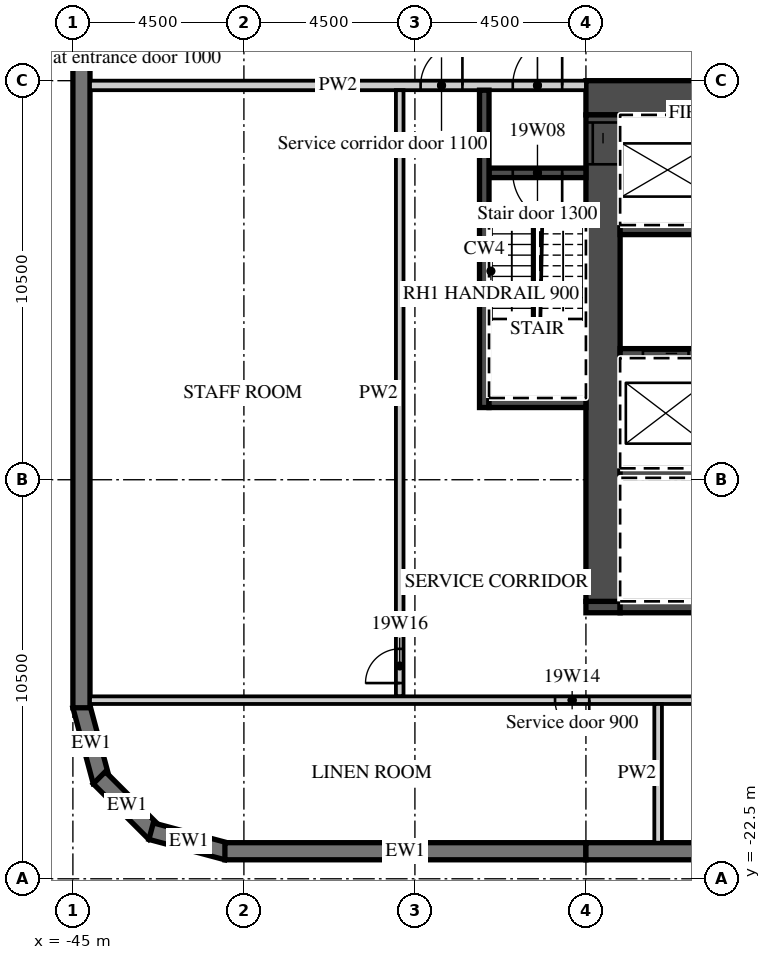
"""IFC4 building model, lengths in metres.
Left out: names, types, materials, properties, quantities, classifications, styles, units other than length and angle.
Written with IfcOpenShell. Run it as: python <this file> out.ifc"""

import sys

from ifc_helpers import new_model, si_unit, direction, frame, frame_2d, origin, place, context, subcontext, project, spatial, polyline, rectangle, outline, extrude, element, fill, save


model = new_model("IFC4")
c1 = context("Model", 3, precision=1e-05, world=origin(), true_north=direction((0.0, 1.0)))
c2 = subcontext(c1, "Body", "Model", "MODEL_VIEW")
j1 = project(units=[si_unit("LENGTHUNIT", "METRE"), si_unit("PLANEANGLEUNIT", "RADIAN")], contexts=[c1])
p1 = place(None, origin())
s1 = spatial("IfcSite", under=j1, at=p1, CompositionType="ELEMENT")
p2 = place(p1, origin())
s2 = spatial("IfcBuilding", under=s1, at=p2, CompositionType="ELEMENT")
p3 = place(p2, frame((0.0, 0.0, 93.0)))
s3 = spatial("IfcBuildingStorey", under=s2, at=p3, CompositionType="ELEMENT", Elevation=93.0)
p4 = place(p3, frame((-44.783, -17.942, 0.0), z_axis=(0.0, 0.0, 1.0), x_axis=(0.25881466832, -0.965926999034, 0.0)))
e1 = element("IfcWall", 1, at=p4, inside=s3, PredefinedType="SOLIDWALL", context=c2, shape_type="SweptSolid", body=[
    extrude(outline(polyline([(0.0, -0.225), (2.071, -0.225), (1.95, 0.225), (0.121, 0.225), (0.0, -0.225)])), origin(), (0.0, 0.0, 1.0), 3.02),
])
p5 = place(p3, frame((-44.305, -19.841, 0.0), z_axis=(0.0, 0.0, 1.0), x_axis=(0.707106781187, -0.707106781187, 0.0)))
e2 = element("IfcWall", 2, at=p5, inside=s3, PredefinedType="SOLIDWALL", context=c2, shape_type="SweptSolid", body=[
    extrude(outline(polyline([(0.0, -0.225), (2.071, -0.225), (1.95, 0.225), (0.121, 0.225), (0.0, -0.225)])), origin(), (0.0, 0.0, 1.0), 3.02),
])
p6 = place(p3, frame((-42.942, -21.247, 0.0), z_axis=(0.0, 0.0, 1.0), x_axis=(0.965926999034, -0.25881466832, 0.0)))
e3 = element("IfcWall", 3, at=p6, inside=s3, PredefinedType="SOLIDWALL", context=c2, shape_type="SweptSolid", body=[
    extrude(outline(polyline([(-0.0, -0.225), (2.07, -0.225), (1.95, 0.225), (0.12, 0.225), (-0.0, -0.225)])), origin(), (0.0, 0.0, 1.0), 3.02),
])
p7 = place(p3, frame((-41.0, -21.775, 0.0), z_axis=(0.0, 0.0, 1.0), x_axis=(1.0, 0.0, 0.0)))
e4 = element("IfcWall", 4, at=p7, inside=s3, PredefinedType="SOLIDWALL", context=c2, shape_type="SweptSolid", body=[
    extrude(rectangle(XDim=9.5, YDim=0.45, at=frame_2d((4.75, 0.0))), origin(), (0.0, 0.0, 1.0), 3.02),
])
p8 = place(p3, frame((-31.5, -21.775, 0.0), z_axis=(0.0, 0.0, 1.0), x_axis=(1.0, 0.0, 0.0)))
e5 = element("IfcWall", 5, at=p8, inside=s3, PredefinedType="SOLIDWALL", context=c2, shape_type="SweptSolid", body=[
    extrude(rectangle(XDim=18.0, YDim=0.45, at=frame_2d((9.0, 0.0))), origin(), (0.0, 0.0, 1.0), 3.02),
])
p9 = place(p3, frame((-44.775, 18.0, 0.0), z_axis=(0.0, 0.0, 1.0), x_axis=(0.0, -1.0, 0.0)))
e6 = element("IfcWall", 6, at=p9, inside=s3, PredefinedType="SOLIDWALL", context=c2, shape_type="SweptSolid", body=[
    extrude(rectangle(XDim=36.0, YDim=0.45, at=frame_2d((18.0, 0.0))), origin(), (0.0, 0.0, 1.0), 3.02),
])
p10 = place(p9, frame((3.9, 0.0, 0.45)))
e7 = element("IfcOpeningElement", 7, at=p10, cuts=e6, PredefinedType="OPENING", context=c2, shape_type="SweptSolid", body=[
    extrude(rectangle(XDim=3.3, YDim=2.25, at=frame_2d((1.65, 1.125))), frame((0.0, 0.235, 0.0), z_axis=(0.0, -1.0, 0.0), x_axis=(1.0, 0.0, 0.0)), (0.0, 0.0, 1.0), 0.47),
])
p11 = place(p9, frame((8.4, 0.0, 0.45)))
e8 = element("IfcOpeningElement", 8, at=p11, cuts=e6, PredefinedType="OPENING", context=c2, shape_type="SweptSolid", body=[
    extrude(rectangle(XDim=3.3, YDim=2.25, at=frame_2d((1.65, 1.125))), frame((0.0, 0.235, 0.0), z_axis=(0.0, -1.0, 0.0), x_axis=(1.0, 0.0, 0.0)), (0.0, 0.0, 1.0), 0.47),
])
p12 = place(p9, frame((12.9, 0.0, 0.45)))
e9 = element("IfcOpeningElement", 9, at=p12, cuts=e6, PredefinedType="OPENING", context=c2, shape_type="SweptSolid", body=[
    extrude(rectangle(XDim=3.3, YDim=2.25, at=frame_2d((1.65, 1.125))), frame((0.0, 0.235, 0.0), z_axis=(0.0, -1.0, 0.0), x_axis=(1.0, 0.0, 0.0)), (0.0, 0.0, 1.0), 0.47),
])
p13 = place(p3, frame((-31.5, -1.95, 0.0), z_axis=(0.0, 0.0, 1.0), x_axis=(1.0, 0.0, 0.0)))
e10 = element("IfcWall", 10, at=p13, inside=s3, PredefinedType="SHEAR", context=c2, shape_type="SweptSolid", body=[
    extrude(rectangle(XDim=18.0, YDim=0.9, at=frame_2d((9.0, 0.0))), origin(), (0.0, 0.0, 1.0), 3.02),
])
p14 = place(p13, frame((14.725, 0.0, 0.0)))
e11 = element("IfcOpeningElement", 11, at=p14, cuts=e10, PredefinedType="OPENING", context=c2, shape_type="SweptSolid", body=[
    extrude(rectangle(XDim=1.8, YDim=2.1, at=frame_2d((0.9, 1.05))), frame((0.0, 0.46, 0.0), z_axis=(0.0, -1.0, 0.0), x_axis=(1.0, 0.0, 0.0)), (0.0, 0.0, 1.0), 0.92),
])
p15 = place(p3, frame((-31.5, -15.35, 0.0), z_axis=(0.0, 0.0, 1.0), x_axis=(1.0, 0.0, 0.0)))
e12 = element("IfcWall", 12, at=p15, inside=s3, PredefinedType="SHEAR", context=c2, shape_type="SweptSolid", body=[
    extrude(rectangle(XDim=0.9, YDim=0.3, at=frame_2d((0.45, 0.0))), origin(), (0.0, 0.0, 1.0), 3.02),
])
p16 = place(p3, frame((-30.6, -15.35, 0.0), z_axis=(0.0, 0.0, 1.0), x_axis=(1.0, 0.0, 0.0)))
e13 = element("IfcWall", 13, at=p16, inside=s3, PredefinedType="SHEAR", context=c2, shape_type="SweptSolid", body=[
    extrude(rectangle(XDim=10.3, YDim=0.3, at=frame_2d((5.15, 0.0))), origin(), (0.0, 0.0, 1.0), 3.02),
])
p17 = place(p16, frame((5.0, 0.0, 0.0)))
e14 = element("IfcOpeningElement", 14, at=p17, cuts=e13, PredefinedType="OPENING", context=c2, shape_type="SweptSolid", body=[
    extrude(rectangle(XDim=1.3, YDim=2.1, at=frame_2d((0.65, 1.05))), frame((0.0, 0.16, 0.0), z_axis=(0.0, -1.0, 0.0), x_axis=(1.0, 0.0, 0.0)), (0.0, 0.0, 1.0), 0.32),
])
p18 = place(p16, frame((6.837, 0.0, 0.0)))
e15 = element("IfcOpeningElement", 15, at=p18, cuts=e13, PredefinedType="OPENING", context=c2, shape_type="SweptSolid", body=[
    extrude(rectangle(XDim=0.9, YDim=2.1, at=frame_2d((0.45, 1.05))), frame((0.0, 0.16, 0.0), z_axis=(0.0, -1.0, 0.0), x_axis=(1.0, 0.0, 0.0)), (0.0, 0.0, 1.0), 0.32),
])
p19 = place(p16, frame((8.663, 0.0, 0.0)))
e16 = element("IfcOpeningElement", 16, at=p19, cuts=e13, PredefinedType="OPENING", context=c2, shape_type="SweptSolid", body=[
    extrude(rectangle(XDim=0.9, YDim=2.1, at=frame_2d((0.45, 1.05))), frame((0.0, 0.16, 0.0), z_axis=(0.0, -1.0, 0.0), x_axis=(1.0, 0.0, 0.0)), (0.0, 0.0, 1.0), 0.32),
])
p20 = place(p3, frame((-31.05, -15.2, 0.0), z_axis=(0.0, 0.0, 1.0), x_axis=(0.0, 1.0, 0.0)))
e17 = element("IfcWall", 17, at=p20, inside=s3, PredefinedType="SHEAR", context=c2, shape_type="SweptSolid", body=[
    extrude(rectangle(XDim=12.8, YDim=0.9, at=frame_2d((6.4, 0.0))), origin(), (0.0, 0.0, 1.0), 3.02),
])
p21 = place(p20, frame((11.5, 0.0, 0.0)))
e18 = element("IfcOpeningElement", 18, at=p21, cuts=e17, PredefinedType="OPENING", context=c2, shape_type="SweptSolid", body=[
    extrude(rectangle(XDim=1.1, YDim=2.1, at=frame_2d((0.55, 1.05))), frame((0.0, 0.46, 0.0), z_axis=(0.0, -1.0, 0.0), x_axis=(1.0, 0.0, 0.0)), (0.0, 0.0, 1.0), 0.92),
])
p22 = place(p3, frame((-30.6, -5.425, 0.0), z_axis=(0.0, 0.0, 1.0), x_axis=(1.0, 0.0, 0.0)))
e19 = element("IfcWall", 19, at=p22, inside=s3, PredefinedType="SHEAR", context=c2, shape_type="SweptSolid", body=[
    extrude(rectangle(XDim=13.0, YDim=0.25, at=frame_2d((6.5, 0.0))), origin(), (0.0, 0.0, 1.0), 3.02),
])
p23 = place(p3, frame((-30.6, -8.675, 0.0), z_axis=(0.0, 0.0, 1.0), x_axis=(1.0, 0.0, 0.0)))
e20 = element("IfcWall", 20, at=p23, inside=s3, PredefinedType="SHEAR", context=c2, shape_type="SweptSolid", body=[
    extrude(rectangle(XDim=16.2, YDim=0.25, at=frame_2d((8.1, 0.0))), origin(), (0.0, 0.0, 1.0), 3.02),
])
p24 = place(p23, frame((0.6, 0.0, 0.0)))
e21 = element("IfcOpeningElement", 21, at=p24, cuts=e20, PredefinedType="OPENING", context=c2, shape_type="SweptSolid", body=[
    extrude(rectangle(XDim=1.2, YDim=2.1, at=frame_2d((0.6, 1.05))), frame((0.0, 0.135, 0.0), z_axis=(0.0, -1.0, 0.0), x_axis=(1.0, 0.0, 0.0)), (0.0, 0.0, 1.0), 0.27),
])
p25 = place(p23, frame((3.25, 0.0, 0.0)))
e22 = element("IfcOpeningElement", 22, at=p25, cuts=e20, PredefinedType="OPENING", context=c2, shape_type="SweptSolid", body=[
    extrude(rectangle(XDim=1.2, YDim=2.1, at=frame_2d((0.6, 1.05))), frame((0.0, 0.135, 0.0), z_axis=(0.0, -1.0, 0.0), x_axis=(1.0, 0.0, 0.0)), (0.0, 0.0, 1.0), 0.27),
])
p26 = place(p23, frame((5.9, 0.0, 0.0)))
e23 = element("IfcOpeningElement", 23, at=p26, cuts=e20, PredefinedType="OPENING", context=c2, shape_type="SweptSolid", body=[
    extrude(rectangle(XDim=1.2, YDim=2.1, at=frame_2d((0.6, 1.05))), frame((0.0, 0.135, 0.0), z_axis=(0.0, -1.0, 0.0), x_axis=(1.0, 0.0, 0.0)), (0.0, 0.0, 1.0), 0.27),
])
p27 = place(p23, frame((14.25, 0.0, 0.0)))
e24 = element("IfcOpeningElement", 24, at=p27, cuts=e20, PredefinedType="OPENING", context=c2, shape_type="SweptSolid", body=[
    extrude(rectangle(XDim=1.3, YDim=2.1, at=frame_2d((0.65, 1.05))), frame((0.0, 0.135, 0.0), z_axis=(0.0, -1.0, 0.0), x_axis=(1.0, 0.0, 0.0)), (0.0, 0.0, 1.0), 0.27),
])
p28 = place(p3, frame((-30.6, -11.825, 0.0), z_axis=(0.0, 0.0, 1.0), x_axis=(1.0, 0.0, 0.0)))
e25 = element("IfcWall", 25, at=p28, inside=s3, PredefinedType="SHEAR", context=c2, shape_type="SweptSolid", body=[
    extrude(rectangle(XDim=13.25, YDim=0.25, at=frame_2d((6.625, 0.0))), origin(), (0.0, 0.0, 1.0), 3.02),
])
p29 = place(p3, frame((-44.55, -1.625, 0.0), z_axis=(0.0, 0.0, 1.0), x_axis=(1.0, 0.0, 0.0)))
e26 = element("IfcWall", 26, at=p29, inside=s3, PredefinedType="PARTITIONING", context=c2, shape_type="SweptSolid", body=[
    extrude(rectangle(XDim=13.05, YDim=0.25, at=frame_2d((6.525, 0.0))), origin(), (0.0, 0.0, 1.0), 3.02),
])
p30 = place(p29, frame((11.125, 0.0, 0.0)))
e27 = element("IfcOpeningElement", 27, at=p30, cuts=e26, PredefinedType="OPENING", context=c2, shape_type="SweptSolid", body=[
    extrude(rectangle(XDim=1.3, YDim=2.1, at=frame_2d((0.65, 1.05))), frame((0.0, 0.135, 0.0), z_axis=(0.0, -1.0, 0.0), x_axis=(1.0, 0.0, 0.0)), (0.0, 0.0, 1.0), 0.27),
])
p31 = place(p29, frame((8.7, 0.0, 0.0)))
e28 = element("IfcOpeningElement", 28, at=p31, cuts=e26, PredefinedType="OPENING", context=c2, shape_type="SweptSolid", body=[
    extrude(rectangle(XDim=1.1, YDim=2.1, at=frame_2d((0.55, 1.05))), frame((0.0, 0.135, 0.0), z_axis=(0.0, -1.0, 0.0), x_axis=(1.0, 0.0, 0.0)), (0.0, 0.0, 1.0), 0.27),
])
p32 = place(p3, frame((-34.05, -3.925, 0.0), z_axis=(0.0, 0.0, 1.0), x_axis=(1.0, 0.0, 0.0)))
e29 = element("IfcWall", 29, at=p32, inside=s3, PredefinedType="SHEAR", context=c2, shape_type="SweptSolid", body=[
    extrude(rectangle(XDim=2.55, YDim=0.25, at=frame_2d((1.275, 0.0))), origin(), (0.0, 0.0, 1.0), 3.02),
])
p33 = place(p32, frame((0.625, 0.0, 0.0)))
e30 = element("IfcOpeningElement", 30, at=p33, cuts=e29, PredefinedType="OPENING", context=c2, shape_type="SweptSolid", body=[
    extrude(rectangle(XDim=1.3, YDim=2.1, at=frame_2d((0.65, 1.05))), frame((0.0, 0.135, 0.0), z_axis=(0.0, -1.0, 0.0), x_axis=(1.0, 0.0, 0.0)), (0.0, 0.0, 1.0), 0.27),
])
p34 = place(p3, frame((-34.175, -10.1, 0.0), z_axis=(0.0, 0.0, 1.0), x_axis=(0.0, 1.0, 0.0)))
e31 = element("IfcWall", 31, at=p34, inside=s3, PredefinedType="SHEAR", context=c2, shape_type="SweptSolid", body=[
    extrude(rectangle(XDim=8.35, YDim=0.25, at=frame_2d((4.175, 0.0))), origin(), (0.0, 0.0, 1.0), 3.02),
])
p35 = place(p3, frame((-34.05, -9.975, 0.0), z_axis=(0.0, 0.0, 1.0), x_axis=(1.0, 0.0, 0.0)))
e32 = element("IfcWall", 32, at=p35, inside=s3, PredefinedType="SHEAR", context=c2, shape_type="SweptSolid", body=[
    extrude(rectangle(XDim=2.55, YDim=0.25, at=frame_2d((1.275, 0.0))), origin(), (0.0, 0.0, 1.0), 3.02),
])
p36 = place(p3, frame((-36.4, -17.7, 0.0), z_axis=(0.0, 0.0, 1.0), x_axis=(0.0, 1.0, 0.0)))
e33 = element("IfcWall", 33, at=p36, inside=s3, PredefinedType="PARTITIONING", context=c2, shape_type="SweptSolid", body=[
    extrude(rectangle(XDim=15.95, YDim=0.2, at=frame_2d((7.975, 0.0))), origin(), (0.0, 0.0, 1.0), 3.02),
])
p37 = place(p36, frame((0.35, 0.0, 0.0)))
e34 = element("IfcOpeningElement", 34, at=p37, cuts=e33, PredefinedType="OPENING", context=c2, shape_type="SweptSolid", body=[
    extrude(rectangle(XDim=0.9, YDim=2.1, at=frame_2d((0.45, 1.05))), frame((0.0, 0.11, 0.0), z_axis=(0.0, -1.0, 0.0), x_axis=(1.0, 0.0, 0.0)), (0.0, 0.0, 1.0), 0.22),
])
p38 = place(p3, frame((-44.55, -17.8, 0.0), z_axis=(0.0, 0.0, 1.0), x_axis=(1.0, 0.0, 0.0)))
e35 = element("IfcWall", 35, at=p38, inside=s3, PredefinedType="PARTITIONING", context=c2, shape_type="SweptSolid", body=[
    extrude(rectangle(XDim=30.95, YDim=0.2, at=frame_2d((15.475, 0.0))), origin(), (0.0, 0.0, 1.0), 3.02),
])
p39 = place(p38, frame((12.238, 0.0, 0.0)))
e36 = element("IfcOpeningElement", 36, at=p39, cuts=e35, PredefinedType="OPENING", context=c2, shape_type="SweptSolid", body=[
    extrude(rectangle(XDim=0.9, YDim=2.1, at=frame_2d((0.45, 1.05))), frame((0.0, 0.11, 0.0), z_axis=(0.0, -1.0, 0.0), x_axis=(1.0, 0.0, 0.0)), (0.0, 0.0, 1.0), 0.22),
])
p40 = place(p38, frame((20.538, 0.0, 0.0)))
e37 = element("IfcOpeningElement", 37, at=p40, cuts=e35, PredefinedType="OPENING", context=c2, shape_type="SweptSolid", body=[
    extrude(rectangle(XDim=0.9, YDim=2.1, at=frame_2d((0.45, 1.05))), frame((0.0, 0.11, 0.0), z_axis=(0.0, -1.0, 0.0), x_axis=(1.0, 0.0, 0.0)), (0.0, 0.0, 1.0), 0.22),
])
p41 = place(p3, frame((-29.6, -21.55, 0.0), z_axis=(0.0, 0.0, 1.0), x_axis=(0.0, 1.0, 0.0)))
e38 = element("IfcWall", 38, at=p41, inside=s3, PredefinedType="PARTITIONING", context=c2, shape_type="SweptSolid", body=[
    extrude(rectangle(XDim=3.65, YDim=0.2, at=frame_2d((1.825, 0.0))), origin(), (0.0, 0.0, 1.0), 3.02),
])
p42 = place(p24, origin())
e39 = element("IfcDoor", 39, at=p42, inside=s3, OperationType="SLIDING_TO_LEFT", PredefinedType="DOOR", context=c2, shape_type="SweptSolid", body=[
    extrude(rectangle(XDim=1.2, YDim=2.1, at=frame_2d((0.6, 1.05))), frame((0.0, 0.025, 0.0), z_axis=(0.0, -1.0, 0.0), x_axis=(1.0, 0.0, 0.0)), (0.0, 0.0, 1.0), 0.05),
])
fill(e21, e39)
p43 = place(p21, origin())
e40 = element("IfcDoor", 40, at=p43, inside=s3, OperationType="SLIDING_TO_RIGHT", PredefinedType="DOOR", context=c2, shape_type="SweptSolid", body=[
    extrude(rectangle(XDim=1.1, YDim=2.1, at=frame_2d((0.55, 1.05))), frame((0.0, 0.025, 0.0), z_axis=(0.0, -1.0, 0.0), x_axis=(1.0, 0.0, 0.0)), (0.0, 0.0, 1.0), 0.05),
])
fill(e18, e40)
p44 = place(p30, origin())
e41 = element("IfcDoor", 41, at=p44, inside=s3, OperationType="SINGLE_SWING_RIGHT", PredefinedType="DOOR", context=c2, shape_type="SweptSolid", body=[
    extrude(rectangle(XDim=1.3, YDim=2.1, at=frame_2d((0.65, 1.05))), frame((0.0, 0.025, 0.0), z_axis=(0.0, -1.0, 0.0), x_axis=(1.0, 0.0, 0.0)), (0.0, 0.0, 1.0), 0.05),
])
fill(e27, e41)
p45 = place(p33, origin())
e42 = element("IfcDoor", 42, at=p45, inside=s3, OperationType="SINGLE_SWING_RIGHT", PredefinedType="DOOR", context=c2, shape_type="SweptSolid", body=[
    extrude(rectangle(XDim=1.3, YDim=2.1, at=frame_2d((0.65, 1.05))), frame((0.0, 0.025, 0.0), z_axis=(0.0, -1.0, 0.0), x_axis=(1.0, 0.0, 0.0)), (0.0, 0.0, 1.0), 0.05),
])
fill(e30, e42)
p46 = place(p31, origin())
e43 = element("IfcDoor", 43, at=p46, inside=s3, OperationType="SINGLE_SWING_RIGHT", PredefinedType="DOOR", context=c2, shape_type="SweptSolid", body=[
    extrude(rectangle(XDim=1.1, YDim=2.1, at=frame_2d((0.55, 1.05))), frame((0.0, 0.025, 0.0), z_axis=(0.0, -1.0, 0.0), x_axis=(1.0, 0.0, 0.0)), (0.0, 0.0, 1.0), 0.05),
])
fill(e28, e43)
p47 = place(p39, origin())
e44 = element("IfcDoor", 44, at=p47, inside=s3, OperationType="SINGLE_SWING_RIGHT", PredefinedType="DOOR", context=c2, shape_type="SweptSolid", body=[
    extrude(rectangle(XDim=0.9, YDim=2.1, at=frame_2d((0.45, 1.05))), frame((0.0, 0.025, 0.0), z_axis=(0.0, -1.0, 0.0), x_axis=(1.0, 0.0, 0.0)), (0.0, 0.0, 1.0), 0.05),
])
fill(e36, e44)
p48 = place(p37, origin())
e45 = element("IfcDoor", 45, at=p48, inside=s3, OperationType="SINGLE_SWING_LEFT", PredefinedType="DOOR", context=c2, shape_type="SweptSolid", body=[
    extrude(rectangle(XDim=0.9, YDim=2.1, at=frame_2d((0.45, 1.05))), frame((0.0, 0.025, 0.0), z_axis=(0.0, -1.0, 0.0), x_axis=(1.0, 0.0, 0.0)), (0.0, 0.0, 1.0), 0.05),
])
fill(e34, e45)
save(model, sys.argv[1])
